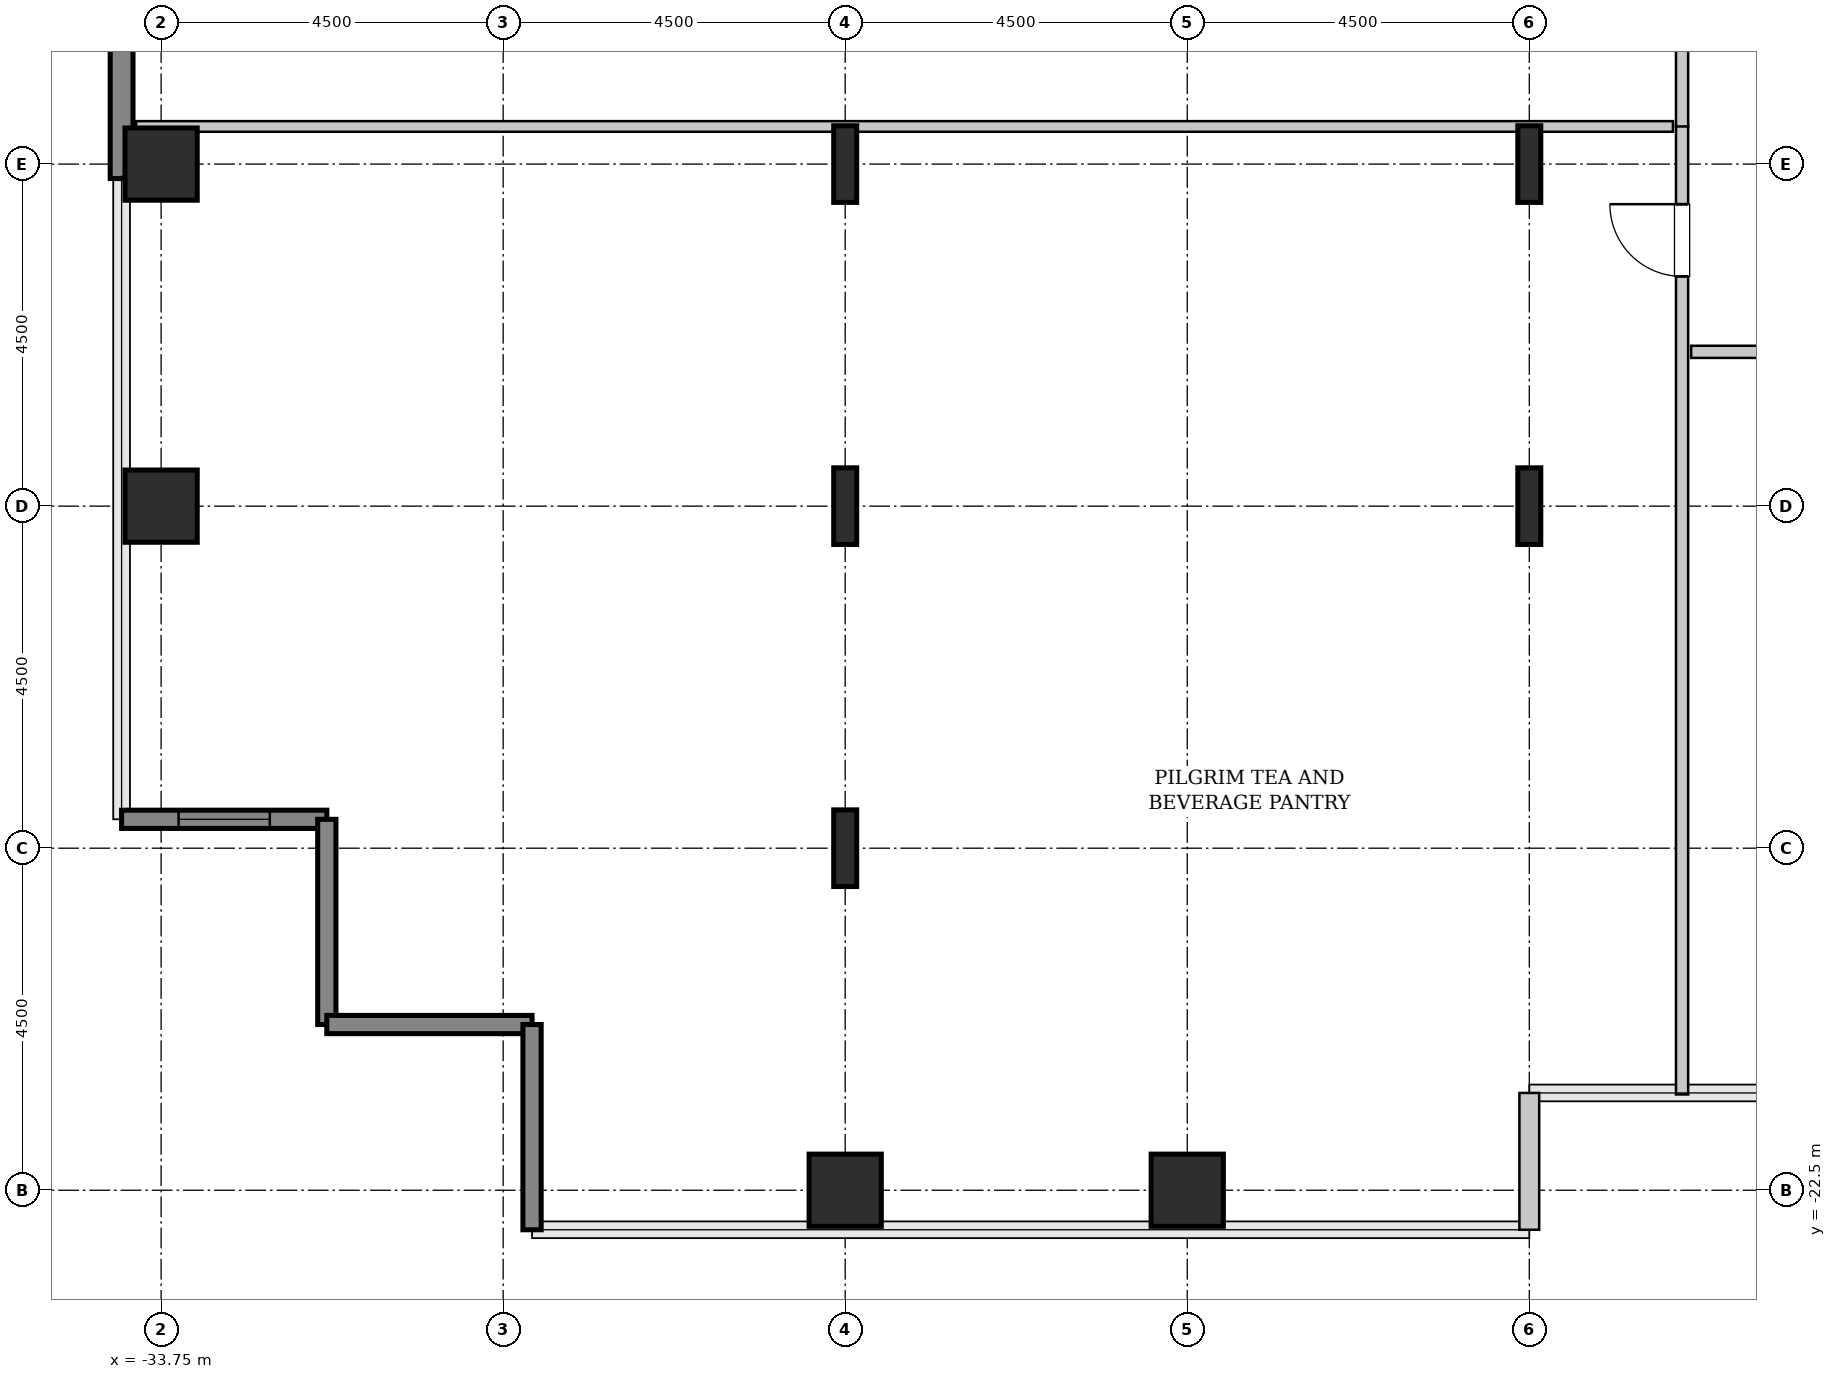
"""IFC4 building model, lengths in metres.
Left out: names, types, materials, properties, quantities, classifications, styles, units other than length and angle.
Written with IfcOpenShell. Run it as: python <this file> out.ifc"""

import sys

from ifc_helpers import new_model, si_unit, direction, frame, frame_2d, origin, origin_2d, place, context, subcontext, project, spatial, rectangle, hollow_rectangle, i_section, extrude, source, transform, mapped, element, fill, save


model = new_model("IFC4")
c1 = context("Model", 3, precision=1e-05, world=origin(), true_north=direction((0.0, 1.0)))
c2 = subcontext(c1, "Body", "Model", "MODEL_VIEW")
j1 = project(units=[si_unit("LENGTHUNIT", "METRE"), si_unit("PLANEANGLEUNIT", "RADIAN")], contexts=[c1])
p1 = place(None, origin())
s1 = spatial("IfcSite", under=j1, at=p1, CompositionType="ELEMENT")
p2 = place(p1, origin())
s2 = spatial("IfcBuilding", under=s1, at=p2, CompositionType="ELEMENT")
p3 = place(p2, frame((0.0, 0.0, 44.4)))
s3 = spatial("IfcBuildingStorey", under=s2, at=p3, CompositionType="ELEMENT", Elevation=44.4)
m1 = source(origin(), c2, "Body", "SweptSolid", [
    extrude(hollow_rectangle(XDim=0.95, YDim=0.95, WallThickness=0.045, InnerFilletRadius=0.045, OuterFilletRadius=0.09, at=origin_2d()), origin(), (0.0, 0.0, 1.0), 3.8),
])
for number, where, z_axis, x_axis in (
    (1, (-33.75, -13.5, 0.0), (0.0, 0.0, 1.0), (1.0, 0.0, 0.0)),
    (2, (-33.75, -9.0, 0.0), (0.0, 0.0, 1.0), (1.0, 0.0, 0.0)),
    (3, (-24.75, -22.5, 0.0), (0.0, 0.0, 1.0), (1.0, 0.0, 0.0)),
):
    element("IfcColumn", number, at=place(p3, frame(where, z_axis=z_axis, x_axis=x_axis)), inside=s3, PredefinedType="COLUMN", context=c2, shape_type="MappedRepresentation", body=[
        mapped(m1, transform((0.0, 0.0, 0.0), x_axis=(1.0, 0.0, 0.0), y_axis=(0.0, 1.0, 0.0), z_axis=(0.0, 0.0, 1.0), scale=1.0)),
    ])
m2 = source(origin(), c2, "Body", "SweptSolid", [
    extrude(i_section(OverallWidth=0.302, OverallDepth=1.008, WebThickness=0.021, FlangeThickness=0.04, FilletRadius=0.03, at=origin_2d()), origin(), (0.0, 0.0, 1.0), 3.8),
])
for number, where, z_axis, x_axis in (
    (4, (-24.75, -18.0, 0.0), (0.0, 0.0, 1.0), (1.0, 0.0, 0.0)),
    (5, (-24.75, -13.5, 0.0), (0.0, 0.0, 1.0), (1.0, 0.0, 0.0)),
    (6, (-24.75, -9.0, 0.0), (0.0, 0.0, 1.0), (1.0, 0.0, 0.0)),
):
    element("IfcColumn", number, at=place(p3, frame(where, z_axis=z_axis, x_axis=x_axis)), inside=s3, PredefinedType="COLUMN", context=c2, shape_type="MappedRepresentation", body=[
        mapped(m2, transform((0.0, 0.0, 0.0), x_axis=(1.0, 0.0, 0.0), y_axis=(0.0, 1.0, 0.0), z_axis=(0.0, 0.0, 1.0), scale=1.0)),
    ])
p4 = place(p3, frame((-20.25, -22.5, 0.0), z_axis=(0.0, 0.0, 1.0), x_axis=(1.0, 0.0, 0.0)))
e7 = element("IfcColumn", 7, at=p4, inside=s3, PredefinedType="COLUMN", context=c2, shape_type="MappedRepresentation", body=[
    mapped(m1, transform((0.0, 0.0, 0.0), x_axis=(1.0, 0.0, 0.0), y_axis=(0.0, 1.0, 0.0), z_axis=(0.0, 0.0, 1.0), scale=1.0)),
])
for number, where, z_axis, x_axis in (
    (8, (-15.75, -13.5, 0.0), (0.0, 0.0, 1.0), (1.0, 0.0, 0.0)),
    (9, (-15.75, -9.0, 0.0), (0.0, 0.0, 1.0), (1.0, 0.0, 0.0)),
):
    element("IfcColumn", number, at=place(p3, frame(where, z_axis=z_axis, x_axis=x_axis)), inside=s3, PredefinedType="COLUMN", context=c2, shape_type="MappedRepresentation", body=[
        mapped(m2, transform((0.0, 0.0, 0.0), x_axis=(1.0, 0.0, 0.0), y_axis=(0.0, 1.0, 0.0), z_axis=(0.0, 0.0, 1.0), scale=1.0)),
    ])
m3 = source(origin(), c2, "Body", "SweptSolid", [
    extrude(rectangle(XDim=4.88, YDim=0.3, at=frame_2d((2.44, 0.0))), origin(), (0.0, 0.0, 1.0), 3.55),
])
p5 = place(p3, frame((-34.27, -9.19, 0.0), z_axis=(0.0, 0.0, 1.0), x_axis=(0.0, 1.0, 0.0)))
e10 = element("IfcWall", 10, at=p5, inside=s3, PredefinedType="SHEAR", context=c2, shape_type="MappedRepresentation", body=[
    mapped(m3, transform((0.0, 0.0, 0.0), x_axis=(1.0, 0.0, 0.0), y_axis=(0.0, 1.0, 0.0), z_axis=(0.0, 0.0, 1.0), scale=1.0)),
])
m4 = source(origin(), c2, "Body", "SweptSolid", [
    extrude(rectangle(XDim=2.7, YDim=0.24, at=frame_2d((1.35, 0.0))), origin(), (0.0, 0.0, 1.0), 3.55),
])
p6 = place(p3, frame((-34.27, -17.62, 0.0), z_axis=(0.0, 0.0, 1.0), x_axis=(1.0, 0.0, 0.0)))
e11 = element("IfcWall", 11, at=p6, inside=s3, PredefinedType="SHEAR", context=c2, shape_type="MappedRepresentation", body=[
    mapped(m4, transform((0.0, 0.0, 0.0), x_axis=(1.0, 0.0, 0.0), y_axis=(0.0, 1.0, 0.0), z_axis=(0.0, 0.0, 1.0), scale=1.0)),
])
p7 = place(p6, frame((0.75, 0.0, 0.85)))
e12 = element("IfcOpeningElement", 12, at=p7, cuts=e11, PredefinedType="OPENING", context=c2, shape_type="SweptSolid", body=[
    extrude(rectangle(XDim=1.2, YDim=1.8, at=frame_2d((0.6, 0.9))), frame((0.0, 0.13, 0.0), z_axis=(0.0, -1.0, 0.0), x_axis=(1.0, 0.0, 0.0)), (0.0, 0.0, 1.0), 0.26),
])
for number, where, z_axis, x_axis in (
    (13, (-31.57, -17.62, 0.0), (0.0, 0.0, 1.0), (0.0, -1.0, 0.0)),
    (14, (-31.57, -20.32, 0.0), (0.0, 0.0, 1.0), (1.0, 0.0, 0.0)),
    (15, (-28.87, -20.32, 0.0), (0.0, 0.0, 1.0), (0.0, -1.0, 0.0)),
):
    element("IfcWall", number, at=place(p3, frame(where, z_axis=z_axis, x_axis=x_axis)), inside=s3, PredefinedType="SHEAR", context=c2, shape_type="MappedRepresentation", body=[
        mapped(m4, transform((0.0, 0.0, 0.0), x_axis=(1.0, 0.0, 0.0), y_axis=(0.0, 1.0, 0.0), z_axis=(0.0, 0.0, 1.0), scale=1.0)),
    ])
m5 = source(origin(), c2, "Body", "SweptSolid", [
    extrude(rectangle(XDim=1.8, YDim=0.26, at=frame_2d((0.9, 0.0))), origin(), (0.0, 0.0, 1.0), 3.55),
])
p8 = place(p3, frame((-15.75, -23.02, 0.0), z_axis=(0.0, 0.0, 1.0), x_axis=(0.0, 1.0, 0.0)))
e16 = element("IfcWall", 16, at=p8, inside=s3, PredefinedType="SOLIDWALL", context=c2, shape_type="MappedRepresentation", body=[
    mapped(m5, transform((0.0, 0.0, 0.0), x_axis=(1.0, 0.0, 0.0), y_axis=(0.0, 1.0, 0.0), z_axis=(0.0, 0.0, 1.0), scale=1.0)),
])
m6 = source(origin(), c2, "Body", "SweptSolid", [
    extrude(rectangle(XDim=12.745, YDim=0.16, at=frame_2d((6.373, 0.0))), origin(), (0.0, 0.0, 1.0), 3.535),
])
p9 = place(p3, frame((-13.74, -21.24, 0.0), z_axis=(0.0, 0.0, 1.0), x_axis=(0.0, 1.0, 0.0)))
e17 = element("IfcWall", 17, at=p9, inside=s3, PredefinedType="PARTITIONING", context=c2, shape_type="MappedRepresentation", body=[
    mapped(m6, transform((0.0, 0.0, 0.0), x_axis=(1.0, 0.0, 0.0), y_axis=(0.0, 1.0, 0.0), z_axis=(0.0, 0.0, 1.0), scale=1.0)),
])
p10 = place(p9, frame((10.762, 0.0, 0.0)))
e18 = element("IfcOpeningElement", 18, at=p10, cuts=e17, PredefinedType="OPENING", context=c2, shape_type="SweptSolid", body=[
    extrude(rectangle(XDim=0.95, YDim=2.1, at=frame_2d((0.475, 1.05))), frame((0.0, 0.09, 0.0), z_axis=(0.0, -1.0, 0.0), x_axis=(1.0, 0.0, 0.0)), (0.0, 0.0, 1.0), 0.18),
])
m7 = source(origin(), c2, "Body", "SweptSolid", [
    extrude(rectangle(XDim=20.22, YDim=0.14, at=frame_2d((10.11, 0.0))), origin(), (0.0, 0.0, 1.0), 2.825),
])
p11 = place(p3, frame((-34.08, -8.505, 0.0), z_axis=(0.0, 0.0, 1.0), x_axis=(1.0, 0.0, 0.0)))
e19 = element("IfcWall", 19, at=p11, inside=s3, PredefinedType="PARTITIONING", context=c2, shape_type="MappedRepresentation", body=[
    mapped(m7, transform((0.0, 0.0, 0.0), x_axis=(1.0, 0.0, 0.0), y_axis=(0.0, 1.0, 0.0), z_axis=(0.0, 0.0, 1.0), scale=1.0)),
])
m8 = source(origin(), c2, "Body", "SweptSolid", [
    extrude(rectangle(XDim=3.41, YDim=0.16, at=frame_2d((1.705, 0.0))), origin(), (0.0, 0.0, 1.0), 3.535),
])
p12 = place(p3, frame((-13.74, -8.505, 0.0), z_axis=(0.0, 0.0, 1.0), x_axis=(0.0, 1.0, 0.0)))
e20 = element("IfcWall", 20, at=p12, inside=s3, PredefinedType="PARTITIONING", context=c2, shape_type="MappedRepresentation", body=[
    mapped(m8, transform((0.0, 0.0, 0.0), x_axis=(1.0, 0.0, 0.0), y_axis=(0.0, 1.0, 0.0), z_axis=(0.0, 0.0, 1.0), scale=1.0)),
])
p13 = place(p12, frame((1.23, 0.0, 0.0)))
e21 = element("IfcOpeningElement", 21, at=p13, cuts=e20, PredefinedType="OPENING", context=c2, shape_type="SweptSolid", body=[
    extrude(rectangle(XDim=0.95, YDim=2.1, at=frame_2d((0.475, 1.05))), frame((0.0, 0.09, 0.0), z_axis=(0.0, -1.0, 0.0), x_axis=(1.0, 0.0, 0.0)), (0.0, 0.0, 1.0), 0.18),
])
m9 = source(origin(), c2, "Body", "SweptSolid", [
    extrude(rectangle(XDim=5.025, YDim=0.16, at=frame_2d((2.513, 0.0))), origin(), (0.0, 0.0, 1.0), 3.535),
])
p14 = place(p3, frame((-13.62, -11.47, 0.0), z_axis=(0.0, 0.0, 1.0), x_axis=(1.0, 0.0, 0.0)))
e22 = element("IfcWall", 22, at=p14, inside=s3, PredefinedType="PARTITIONING", context=c2, shape_type="MappedRepresentation", body=[
    mapped(m9, transform((0.0, 0.0, 0.0), x_axis=(1.0, 0.0, 0.0), y_axis=(0.0, 1.0, 0.0), z_axis=(0.0, 0.0, 1.0), scale=1.0)),
])
p15 = place(p14, frame((2.038, 0.0, 0.0)))
e23 = element("IfcOpeningElement", 23, at=p15, cuts=e22, PredefinedType="OPENING", context=c2, shape_type="SweptSolid", body=[
    extrude(rectangle(XDim=0.95, YDim=2.1, at=frame_2d((0.475, 1.05))), frame((0.0, 0.09, 0.0), z_axis=(0.0, -1.0, 0.0), x_axis=(1.0, 0.0, 0.0)), (0.0, 0.0, 1.0), 0.18),
])
m10 = source(origin(), c2, "Body", "SweptSolid", [
    extrude(rectangle(XDim=1.2, YDim=1.8, at=frame_2d((0.6, 0.9))), frame((0.0, 0.03, 0.0), z_axis=(0.0, -1.0, 0.0), x_axis=(1.0, 0.0, 0.0)), (0.0, 0.0, 1.0), 0.06),
])
p16 = place(p7, origin())
e24 = element("IfcWindow", 24, at=p16, inside=s3, PartitioningType="SINGLE_PANEL", PredefinedType="WINDOW", context=c2, shape_type="MappedRepresentation", body=[
    mapped(m10, transform((0.0, 0.0, 0.0), x_axis=(1.0, 0.0, 0.0), y_axis=(0.0, 1.0, 0.0), z_axis=(0.0, 0.0, 1.0), scale=1.0)),
])
fill(e12, e24)
m11 = source(origin(), c2, "Body", "SweptSolid", [
    extrude(rectangle(XDim=0.95, YDim=2.1, at=frame_2d((0.475, 1.05))), frame((0.0, 0.025, 0.0), z_axis=(0.0, -1.0, 0.0), x_axis=(1.0, 0.0, 0.0)), (0.0, 0.0, 1.0), 0.05),
])
p17 = place(p10, origin())
e25 = element("IfcDoor", 25, at=p17, inside=s3, OperationType="SINGLE_SWING_RIGHT", PredefinedType="DOOR", context=c2, shape_type="MappedRepresentation", body=[
    mapped(m11, transform((0.0, 0.0, 0.0), x_axis=(1.0, 0.0, 0.0), y_axis=(0.0, 1.0, 0.0), z_axis=(0.0, 0.0, 1.0), scale=1.0)),
])
fill(e18, e25)
save(model, sys.argv[1])
